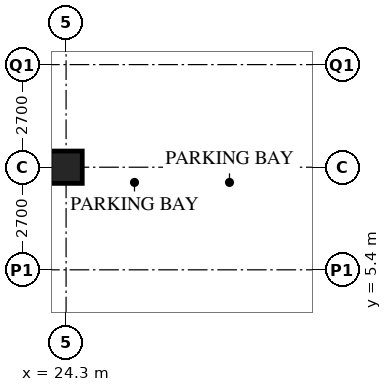
"""IFC4 building model, lengths in metres.
Left out: names, types, materials, properties, quantities, classifications, styles, units other than length and angle.
Written with IfcOpenShell. Run it as: python <this file> out.ifc"""

import sys

from ifc_helpers import new_model, si_unit, direction, frame, origin, origin_2d, place, context, subcontext, project, spatial, hollow_rectangle, extrude, element, save


model = new_model("IFC4")
c1 = context("Model", 3, precision=1e-05, world=origin(), true_north=direction((0.0, 1.0)))
c2 = subcontext(c1, "Body", "Model", "MODEL_VIEW")
j1 = project(units=[si_unit("LENGTHUNIT", "METRE"), si_unit("PLANEANGLEUNIT", "RADIAN")], contexts=[c1])
p1 = place(None, origin())
s1 = spatial("IfcSite", under=j1, at=p1, CompositionType="ELEMENT")
p2 = place(p1, origin())
s2 = spatial("IfcBuilding", under=s1, at=p2, CompositionType="ELEMENT")
p3 = place(p2, frame((0.0, 0.0, -4.2)))
s3 = spatial("IfcBuildingStorey", under=s2, at=p3, CompositionType="ELEMENT", Elevation=-4.2)
p4 = place(p3, frame((24.3, 8.1, 0.0), z_axis=(0.0, 0.0, 1.0), x_axis=(1.0, 0.0, 0.0)))
e1 = element("IfcColumn", 1, at=p4, inside=s3, PredefinedType="COLUMN", context=c2, shape_type="SweptSolid", body=[
    extrude(hollow_rectangle(XDim=0.85, YDim=0.85, WallThickness=0.085, at=origin_2d()), origin(), (0.0, 0.0, 1.0), 4.2),
])
save(model, sys.argv[1])
